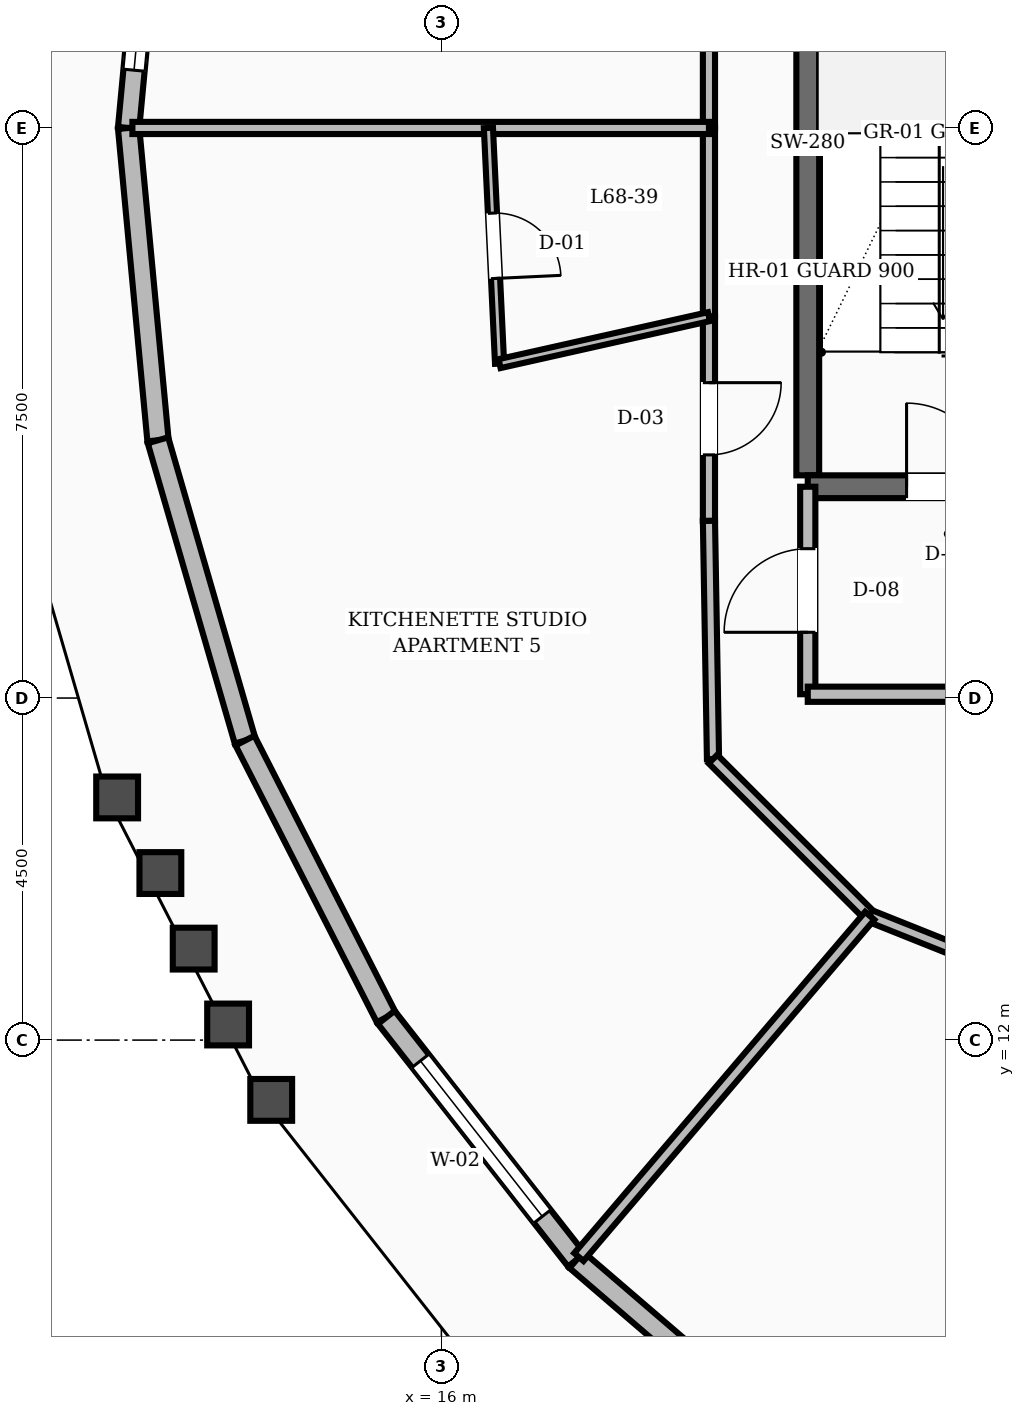
"""IFC4 building model, lengths in metres.
Left out: names, types, materials, properties, quantities, classifications, styles, units other than length and angle.
Written with IfcOpenShell. Run it as: python <this file> out.ifc"""

import sys

from ifc_helpers import new_model, si_unit, direction, frame, frame_2d, origin, place, context, subcontext, project, spatial, rectangle, extrude, element, fill, save


model = new_model("IFC4")
c1 = context("Model", 3, precision=1e-05, world=origin(), true_north=direction((0.0, 1.0)))
c2 = subcontext(c1, "Body", "Model", "MODEL_VIEW")
j1 = project(units=[si_unit("LENGTHUNIT", "METRE"), si_unit("PLANEANGLEUNIT", "RADIAN")], contexts=[c1])
p1 = place(None, origin())
s1 = spatial("IfcSite", under=j1, at=p1, CompositionType="ELEMENT")
p2 = place(p1, origin())
s2 = spatial("IfcBuilding", under=s1, at=p2, CompositionType="ELEMENT")
p3 = place(p2, frame((0.0, 0.0, 261.6)))
s3 = spatial("IfcBuildingStorey", under=s2, at=p3, CompositionType="ELEMENT", Elevation=261.6)
p4 = place(p3, frame((20.82, 19.43, 0.0), z_axis=(0.0, 0.0, 1.0), x_axis=(0.0, 1.0, 0.0)))
e1 = element("IfcWall", 1, at=p4, inside=s3, PredefinedType="SHEAR", context=c2, shape_type="SweptSolid", body=[
    extrude(rectangle(XDim=8.74, YDim=0.3, at=frame_2d((4.37, 0.0))), origin(), (0.0, 0.0, 1.0), 3.6),
])
p5 = place(p3, frame((20.82, 19.28, 0.0), z_axis=(0.0, 0.0, 1.0), x_axis=(1.0, 0.0, 0.0)))
e2 = element("IfcWall", 2, at=p5, inside=s3, PredefinedType="SHEAR", context=c2, shape_type="SweptSolid", body=[
    extrude(rectangle(XDim=3.6, YDim=0.3, at=frame_2d((1.8, 0.0))), origin(), (0.0, 0.0, 1.0), 3.6),
])
p6 = place(p5, frame((1.3, 0.0, 0.0)))
e3 = element("IfcOpeningElement", 3, at=p6, cuts=e2, PredefinedType="OPENING", context=c2, shape_type="SweptSolid", body=[
    extrude(rectangle(XDim=1.1, YDim=2.1, at=frame_2d((0.55, 1.05))), frame((0.0, 0.16, 0.0), z_axis=(0.0, -1.0, 0.0), x_axis=(1.0, 0.0, 0.0)), (0.0, 0.0, 1.0), 0.32),
])
p7 = place(p3, frame((12.271, 28.109, 0.0), z_axis=(0.0, 0.0, 1.0), x_axis=(-0.093644905581, -0.995605660721, 0.0)))
e4 = element("IfcWall", 4, at=p7, inside=s3, PredefinedType="STANDARD", context=c2, shape_type="SweptSolid", body=[
    extrude(rectangle(XDim=4.127, YDim=0.28, at=frame_2d((2.063, 0.0))), origin(), (0.0, 0.0, 1.0), 2.88),
])
p8 = place(p7, frame((0.763, 0.0, 0.8)))
e5 = element("IfcOpeningElement", 5, at=p8, cuts=e4, PredefinedType="OPENING", context=c2, shape_type="SweptSolid", body=[
    extrude(rectangle(XDim=2.6, YDim=1.65, at=frame_2d((1.3, 0.825))), frame((0.0, 0.15, 0.0), z_axis=(0.0, -1.0, 0.0), x_axis=(1.0, 0.0, 0.0)), (0.0, 0.0, 1.0), 0.3),
])
p9 = place(p3, frame((11.885, 24.0, 0.0), z_axis=(0.0, 0.0, 1.0), x_axis=(0.093644905581, -0.995605660721, 0.0)))
e6 = element("IfcWall", 6, at=p9, inside=s3, PredefinedType="STANDARD", context=c2, shape_type="SweptSolid", body=[
    extrude(rectangle(XDim=4.127, YDim=0.28, at=frame_2d((2.063, 0.0))), origin(), (0.0, 0.0, 1.0), 2.88),
])
p10 = place(p3, frame((12.271, 19.891, 0.0), z_axis=(0.0, 0.0, 1.0), x_axis=(0.278246863013, -0.960509595592, 0.0)))
e7 = element("IfcWall", 7, at=p10, inside=s3, PredefinedType="STANDARD", context=c2, shape_type="SweptSolid", body=[
    extrude(rectangle(XDim=4.113, YDim=0.28, at=frame_2d((2.057, 0.0))), origin(), (0.0, 0.0, 1.0), 2.88),
])
p11 = place(p3, frame((13.416, 15.94, 0.0), z_axis=(0.0, 0.0, 1.0), x_axis=(0.454698544749, -0.89064540273, 0.0)))
e8 = element("IfcWall", 8, at=p11, inside=s3, PredefinedType="STANDARD", context=c2, shape_type="SweptSolid", body=[
    extrude(rectangle(XDim=4.088, YDim=0.28, at=frame_2d((2.044, 0.0))), origin(), (0.0, 0.0, 1.0), 2.88),
])
p12 = place(p3, frame((15.275, 12.299, 0.0), z_axis=(0.0, 0.0, 1.0), x_axis=(0.616903837432, -0.787038534864, 0.0)))
e9 = element("IfcWall", 9, at=p12, inside=s3, PredefinedType="STANDARD", context=c2, shape_type="SweptSolid", body=[
    extrude(rectangle(XDim=4.055, YDim=0.28, at=frame_2d((2.028, 0.0))), origin(), (0.0, 0.0, 1.0), 2.88),
])
p13 = place(p12, frame((0.728, 0.0, 0.8)))
e10 = element("IfcOpeningElement", 10, at=p13, cuts=e9, PredefinedType="OPENING", context=c2, shape_type="SweptSolid", body=[
    extrude(rectangle(XDim=2.6, YDim=1.65, at=frame_2d((1.3, 0.825))), frame((0.0, 0.15, 0.0), z_axis=(0.0, -1.0, 0.0), x_axis=(1.0, 0.0, 0.0)), (0.0, 0.0, 1.0), 0.3),
])
p14 = place(p3, frame((17.777, 9.107, 0.0), z_axis=(0.0, 0.0, 1.0), x_axis=(0.758458425967, -0.651721425212, 0.0)))
e11 = element("IfcWall", 11, at=p14, inside=s3, PredefinedType="STANDARD", context=c2, shape_type="SweptSolid", body=[
    extrude(rectangle(XDim=4.019, YDim=0.28, at=frame_2d((2.009, 0.0))), origin(), (0.0, 0.0, 1.0), 2.88),
])
p15 = place(p3, frame((20.82, 16.55, 0.0), z_axis=(0.0, 0.0, 1.0), x_axis=(0.0, 1.0, 0.0)))
e12 = element("IfcWall", 12, at=p15, inside=s3, PredefinedType="SOLIDWALL", context=c2, shape_type="SweptSolid", body=[
    extrude(rectangle(XDim=2.73, YDim=0.2, at=frame_2d((1.365, 0.0))), origin(), (0.0, 0.0, 1.0), 2.87),
])
p16 = place(p15, frame((0.815, 0.0, 0.0)))
e13 = element("IfcOpeningElement", 13, at=p16, cuts=e12, PredefinedType="OPENING", context=c2, shape_type="SweptSolid", body=[
    extrude(rectangle(XDim=1.1, YDim=2.1, at=frame_2d((0.55, 1.05))), frame((0.0, 0.11, 0.0), z_axis=(0.0, -1.0, 0.0), x_axis=(1.0, 0.0, 0.0)), (0.0, 0.0, 1.0), 0.22),
])
p17 = place(p3, frame((20.82, 16.55, 0.0), z_axis=(0.0, 0.0, 1.0), x_axis=(1.0, 0.0, 0.0)))
e14 = element("IfcWall", 14, at=p17, inside=s3, PredefinedType="SOLIDWALL", context=c2, shape_type="SweptSolid", body=[
    extrude(rectangle(XDim=3.98, YDim=0.2, at=frame_2d((1.99, 0.0))), origin(), (0.0, 0.0, 1.0), 2.87),
])
for number, where, z_axis, x_axis in (
    (15, (19.52, 26.482, 0.0), (0.0, 0.0, 1.0), (0.0, -1.0, 0.0)),
    (16, (19.52, 24.0, 0.0), (0.0, 0.0, 1.0), (0.0, -1.0, 0.0)),
):
    element("IfcWall", number, at=place(p3, frame(where, z_axis=z_axis, x_axis=x_axis)), inside=s3, PredefinedType="SOLIDWALL", context=c2, shape_type="SweptSolid", body=[
        extrude(rectangle(XDim=2.482, YDim=0.16, at=frame_2d((1.241, 0.0))), origin(), (0.0, 0.0, 1.0), 2.87),
    ])
p18 = place(p3, frame((19.52, 21.518, 0.0), z_axis=(0.0, 0.0, 1.0), x_axis=(0.0, -1.0, 0.0)))
e17 = element("IfcWall", 17, at=p18, inside=s3, PredefinedType="SOLIDWALL", context=c2, shape_type="SweptSolid", body=[
    extrude(rectangle(XDim=2.687, YDim=0.16, at=frame_2d((1.344, 0.0))), origin(), (0.0, 0.0, 1.0), 2.87),
])
p19 = place(p18, frame((0.868, 0.0, 0.0)))
e18 = element("IfcOpeningElement", 18, at=p19, cuts=e17, PredefinedType="OPENING", context=c2, shape_type="SweptSolid", body=[
    extrude(rectangle(XDim=0.95, YDim=2.1, at=frame_2d((0.475, 1.05))), frame((0.0, 0.09, 0.0), z_axis=(0.0, -1.0, 0.0), x_axis=(1.0, 0.0, 0.0)), (0.0, 0.0, 1.0), 0.18),
])
p20 = place(p3, frame((19.52, 18.831, 0.0), z_axis=(0.0, 0.0, 1.0), x_axis=(0.016981035134, -0.999855811828, 0.0)))
e19 = element("IfcWall", 19, at=p20, inside=s3, PredefinedType="SOLIDWALL", context=c2, shape_type="SweptSolid", body=[
    extrude(rectangle(XDim=3.134, YDim=0.16, at=frame_2d((1.567, 0.0))), origin(), (0.0, 0.0, 1.0), 2.87),
])
p21 = place(p3, frame((19.573, 15.697, 0.0), z_axis=(0.0, 0.0, 1.0), x_axis=(0.707106781187, -0.707106781187, 0.0)))
e20 = element("IfcWall", 20, at=p21, inside=s3, PredefinedType="SOLIDWALL", context=c2, shape_type="SweptSolid", body=[
    extrude(rectangle(XDim=2.916, YDim=0.16, at=frame_2d((1.458, 0.0))), origin(), (0.0, 0.0, 1.0), 2.87),
])
p22 = place(p3, frame((21.635, 13.635, 0.0), z_axis=(0.0, 0.0, 1.0), x_axis=(0.92856882165, -0.371160266542, 0.0)))
e21 = element("IfcWall", 21, at=p22, inside=s3, PredefinedType="SOLIDWALL", context=c2, shape_type="SweptSolid", body=[
    extrude(rectangle(XDim=2.923, YDim=0.16, at=frame_2d((1.461, 0.0))), origin(), (0.0, 0.0, 1.0), 2.87),
])
p23 = place(p3, frame((19.52, 24.0, 0.0), z_axis=(0.0, 0.0, 1.0), x_axis=(-1.0, 0.0, 0.0)))
e22 = element("IfcWall", 22, at=p23, inside=s3, PredefinedType="SOLIDWALL", context=c2, shape_type="SweptSolid", body=[
    extrude(rectangle(XDim=7.585, YDim=0.16, at=frame_2d((3.792, 0.0))), origin(), (0.0, 0.0, 1.0), 2.87),
])
p24 = place(p3, frame((16.619, 24.0, 0.0), z_axis=(0.0, 0.0, 1.0), x_axis=(0.047273648919, -0.99888197607, 0.0)))
e23 = element("IfcWall", 23, at=p24, inside=s3, PredefinedType="PARTITIONING", context=c2, shape_type="SweptSolid", body=[
    extrude(rectangle(XDim=3.104, YDim=0.12, at=frame_2d((1.552, 0.0))), origin(), (0.0, 0.0, 1.0), 2.87),
])
p25 = place(p24, frame((1.122, 0.0, 0.0)))
e24 = element("IfcOpeningElement", 24, at=p25, cuts=e23, PredefinedType="OPENING", context=c2, shape_type="SweptSolid", body=[
    extrude(rectangle(XDim=0.86, YDim=2.1, at=frame_2d((0.43, 1.05))), frame((0.0, 0.07, 0.0), z_axis=(0.0, -1.0, 0.0), x_axis=(1.0, 0.0, 0.0)), (0.0, 0.0, 1.0), 0.14),
])
p26 = place(p3, frame((19.52, 21.518, 0.0), z_axis=(0.0, 0.0, 1.0), x_axis=(-0.975751695347, -0.218880398912, 0.0)))
e25 = element("IfcWall", 25, at=p26, inside=s3, PredefinedType="PARTITIONING", context=c2, shape_type="SweptSolid", body=[
    extrude(rectangle(XDim=2.823, YDim=0.12, at=frame_2d((1.412, 0.0))), origin(), (0.0, 0.0, 1.0), 2.87),
])
p27 = place(p3, frame((21.635, 13.635, 0.0), z_axis=(0.0, 0.0, 1.0), x_axis=(-0.648641435067, -0.761094139193, 0.0)))
e26 = element("IfcWall", 26, at=p27, inside=s3, PredefinedType="SOLIDWALL", context=c2, shape_type="SweptSolid", body=[
    extrude(rectangle(XDim=5.899, YDim=0.16, at=frame_2d((2.949, 0.0))), origin(), (0.0, 0.0, 1.0), 2.87),
])
p28 = place(p8, origin())
e27 = element("IfcWindow", 27, at=p28, inside=s3, PartitioningType="SINGLE_PANEL", PredefinedType="WINDOW", context=c2, shape_type="SweptSolid", body=[
    extrude(rectangle(XDim=2.6, YDim=1.65, at=frame_2d((1.3, 0.825))), frame((0.0, 0.03, 0.0), z_axis=(0.0, -1.0, 0.0), x_axis=(1.0, 0.0, 0.0)), (0.0, 0.0, 1.0), 0.06),
])
fill(e5, e27)
p29 = place(p13, origin())
e28 = element("IfcWindow", 28, at=p29, inside=s3, PartitioningType="SINGLE_PANEL", PredefinedType="WINDOW", context=c2, shape_type="SweptSolid", body=[
    extrude(rectangle(XDim=2.6, YDim=1.65, at=frame_2d((1.3, 0.825))), frame((0.0, 0.03, 0.0), z_axis=(0.0, -1.0, 0.0), x_axis=(1.0, 0.0, 0.0)), (0.0, 0.0, 1.0), 0.06),
])
fill(e10, e28)
p30 = place(p6, origin())
e29 = element("IfcDoor", 29, at=p30, inside=s3, OperationType="SINGLE_SWING_LEFT", PredefinedType="DOOR", context=c2, shape_type="SweptSolid", body=[
    extrude(rectangle(XDim=1.1, YDim=2.1, at=frame_2d((0.55, 1.05))), frame((0.0, 0.025, 0.0), z_axis=(0.0, -1.0, 0.0), x_axis=(1.0, 0.0, 0.0)), (0.0, 0.0, 1.0), 0.05),
])
fill(e3, e29)
p31 = place(p16, origin())
e30 = element("IfcDoor", 30, at=p31, inside=s3, OperationType="SINGLE_SWING_LEFT", PredefinedType="DOOR", context=c2, shape_type="SweptSolid", body=[
    extrude(rectangle(XDim=1.1, YDim=2.1, at=frame_2d((0.55, 1.05))), frame((0.0, 0.025, 0.0), z_axis=(0.0, -1.0, 0.0), x_axis=(1.0, 0.0, 0.0)), (0.0, 0.0, 1.0), 0.05),
])
fill(e13, e30)
p32 = place(p25, origin())
e31 = element("IfcDoor", 31, at=p32, inside=s3, OperationType="SINGLE_SWING_RIGHT", PredefinedType="DOOR", context=c2, shape_type="SweptSolid", body=[
    extrude(rectangle(XDim=0.86, YDim=2.1, at=frame_2d((0.43, 1.05))), frame((0.0, 0.025, 0.0), z_axis=(0.0, -1.0, 0.0), x_axis=(1.0, 0.0, 0.0)), (0.0, 0.0, 1.0), 0.05),
])
fill(e24, e31)
p33 = place(p19, origin())
e32 = element("IfcDoor", 32, at=p33, inside=s3, OperationType="SINGLE_SWING_LEFT", PredefinedType="DOOR", context=c2, shape_type="SweptSolid", body=[
    extrude(rectangle(XDim=0.95, YDim=2.1, at=frame_2d((0.475, 1.05))), frame((0.0, 0.025, 0.0), z_axis=(0.0, -1.0, 0.0), x_axis=(1.0, 0.0, 0.0)), (0.0, 0.0, 1.0), 0.05),
])
fill(e18, e32)
save(model, sys.argv[1])
